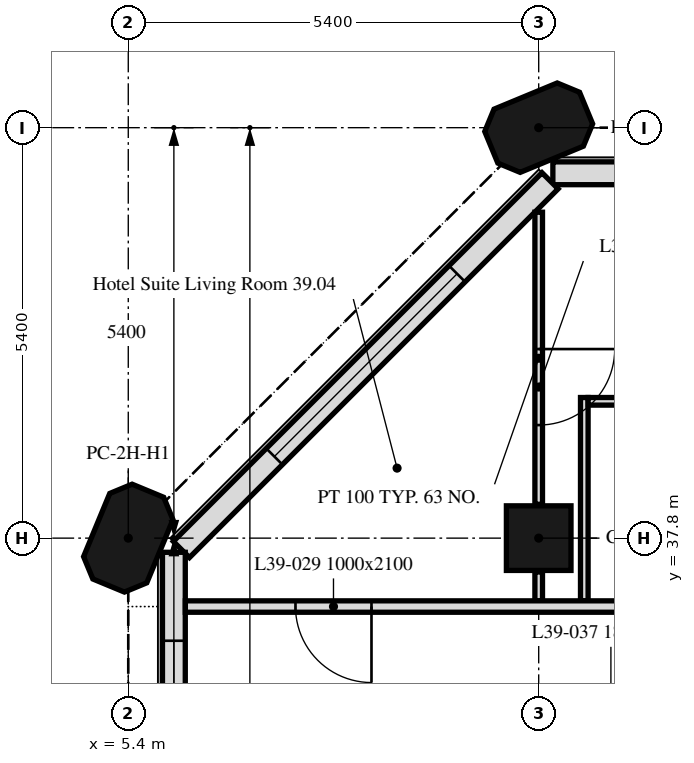
"""IFC4 building model, lengths in metres.
Left out: names, types, materials, properties, quantities, classifications, styles, units other than length and angle.
Written with IfcOpenShell. Run it as: python <this file> out.ifc"""

import sys

from ifc_helpers import new_model, si_unit, direction, frame, frame_2d, origin, origin_2d, place, context, subcontext, project, spatial, polyline, rectangle, outline, extrude, element, fill, save


model = new_model("IFC4")
c1 = context("Model", 3, precision=1e-05, world=origin(), true_north=direction((0.0, 1.0)))
c2 = subcontext(c1, "Body", "Model", "MODEL_VIEW")
j1 = project(units=[si_unit("LENGTHUNIT", "METRE"), si_unit("PLANEANGLEUNIT", "RADIAN")], contexts=[c1])
p1 = place(None, origin())
s1 = spatial("IfcSite", under=j1, at=p1, CompositionType="ELEMENT")
p2 = place(p1, origin())
s2 = spatial("IfcBuilding", under=s1, at=p2, CompositionType="ELEMENT")
p3 = place(p2, frame((0.0, 0.0, 166.0)))
s3 = spatial("IfcBuildingStorey", under=s2, at=p3, CompositionType="ELEMENT", Elevation=166.0)
p4 = place(p3, frame((5.4, 37.8, 0.0), z_axis=(0.0, 0.0, 1.0), x_axis=(0.382683432365, 0.923879532511, 0.0)))
e1 = element("IfcColumn", 1, at=p4, inside=s3, PredefinedType="COLUMN", context=c2, shape_type="SweptSolid", body=[
    extrude(outline(polyline([(-0.45, -0.45), (0.45, -0.45), (0.675, -0.225), (0.675, 0.225), (0.45, 0.45), (-0.45, 0.45), (-0.675, 0.225), (-0.675, -0.225), (-0.45, -0.45)])), origin(), (0.0, 0.0, 1.0), 3.0),
])
p5 = place(p3, frame((10.8, 37.8, 0.0), z_axis=(0.0, 0.0, 1.0), x_axis=(1.0, 0.0, 0.0)))
e2 = element("IfcColumn", 2, at=p5, inside=s3, PredefinedType="COLUMN", context=c2, shape_type="SweptSolid", body=[
    extrude(rectangle(XDim=0.85, YDim=0.85, at=origin_2d()), origin(), (0.0, 0.0, 1.0), 3.0),
])
p6 = place(p3, frame((10.8, 43.2, 0.0), z_axis=(0.0, 0.0, 1.0), x_axis=(0.923879532511, 0.382683432365, 0.0)))
e3 = element("IfcColumn", 3, at=p6, inside=s3, PredefinedType="COLUMN", context=c2, shape_type="SweptSolid", body=[
    extrude(outline(polyline([(-0.45, -0.45), (0.45, -0.45), (0.675, -0.225), (0.675, 0.225), (0.45, 0.45), (-0.45, 0.45), (-0.675, 0.225), (-0.675, -0.225), (-0.45, -0.45)])), origin(), (0.0, 0.0, 1.0), 3.0),
])
p7 = place(p3, frame((43.014, 42.6, 0.0), z_axis=(0.0, 0.0, 1.0), x_axis=(-1.0, 0.0, 0.0)))
e4 = element("IfcWall", 4, at=p7, inside=s3, PredefinedType="SOLIDWALL", context=c2, shape_type="SweptSolid", body=[
    extrude(rectangle(XDim=32.027, YDim=0.3, at=frame_2d((16.014, 0.0))), origin(), (0.0, 0.0, 1.0), 3.0),
])
p8 = place(p7, frame((0.814, 0.0, 0.9)))
e5 = element("IfcOpeningElement", 5, at=p8, cuts=e4, PredefinedType="OPENING", context=c2, shape_type="SweptSolid", body=[
    extrude(rectangle(XDim=3.4, YDim=1.7, at=frame_2d((1.7, 0.85))), frame((0.0, 0.16, 0.0), z_axis=(0.0, -1.0, 0.0), x_axis=(1.0, 0.0, 0.0)), (0.0, 0.0, 1.0), 0.32),
])
p9 = place(p7, frame((6.564, 0.0, 0.9)))
e6 = element("IfcOpeningElement", 6, at=p9, cuts=e4, PredefinedType="OPENING", context=c2, shape_type="SweptSolid", body=[
    extrude(rectangle(XDim=1.1, YDim=1.7, at=frame_2d((0.55, 0.85))), frame((0.0, 0.16, 0.0), z_axis=(0.0, -1.0, 0.0), x_axis=(1.0, 0.0, 0.0)), (0.0, 0.0, 1.0), 0.32),
])
p10 = place(p7, frame((11.614, 0.0, 0.9)))
e7 = element("IfcOpeningElement", 7, at=p10, cuts=e4, PredefinedType="OPENING", context=c2, shape_type="SweptSolid", body=[
    extrude(rectangle(XDim=3.4, YDim=1.7, at=frame_2d((1.7, 0.85))), frame((0.0, 0.16, 0.0), z_axis=(0.0, -1.0, 0.0), x_axis=(1.0, 0.0, 0.0)), (0.0, 0.0, 1.0), 0.32),
])
p11 = place(p7, frame((17.364, 0.0, 0.9)))
e8 = element("IfcOpeningElement", 8, at=p11, cuts=e4, PredefinedType="OPENING", context=c2, shape_type="SweptSolid", body=[
    extrude(rectangle(XDim=1.1, YDim=1.7, at=frame_2d((0.55, 0.85))), frame((0.0, 0.16, 0.0), z_axis=(0.0, -1.0, 0.0), x_axis=(1.0, 0.0, 0.0)), (0.0, 0.0, 1.0), 0.32),
])
p12 = place(p7, frame((22.414, 0.0, 0.9)))
e9 = element("IfcOpeningElement", 9, at=p12, cuts=e4, PredefinedType="OPENING", context=c2, shape_type="SweptSolid", body=[
    extrude(rectangle(XDim=3.4, YDim=1.7, at=frame_2d((1.7, 0.85))), frame((0.0, 0.16, 0.0), z_axis=(0.0, -1.0, 0.0), x_axis=(1.0, 0.0, 0.0)), (0.0, 0.0, 1.0), 0.32),
])
p13 = place(p7, frame((28.164, 0.0, 0.9)))
e10 = element("IfcOpeningElement", 10, at=p13, cuts=e4, PredefinedType="OPENING", context=c2, shape_type="SweptSolid", body=[
    extrude(rectangle(XDim=1.1, YDim=1.7, at=frame_2d((0.55, 0.85))), frame((0.0, 0.16, 0.0), z_axis=(0.0, -1.0, 0.0), x_axis=(1.0, 0.0, 0.0)), (0.0, 0.0, 1.0), 0.32),
])
p14 = place(p3, frame((10.949, 42.501, 0.0), z_axis=(0.0, 0.0, 1.0), x_axis=(-0.707106781187, -0.707106781187, 0.0)))
e11 = element("IfcWall", 11, at=p14, inside=s3, PredefinedType="SOLIDWALL", context=c2, shape_type="SweptSolid", body=[
    extrude(rectangle(XDim=6.86, YDim=0.3, at=frame_2d((3.43, 0.0))), origin(), (0.0, 0.0, 1.0), 3.0),
])
p15 = place(p14, frame((1.73, 0.0, 0.9)))
e12 = element("IfcOpeningElement", 12, at=p15, cuts=e11, PredefinedType="OPENING", context=c2, shape_type="SweptSolid", body=[
    extrude(rectangle(XDim=3.4, YDim=1.7, at=frame_2d((1.7, 0.85))), frame((0.0, 0.16, 0.0), z_axis=(0.0, -1.0, 0.0), x_axis=(1.0, 0.0, 0.0)), (0.0, 0.0, 1.0), 0.32),
])
p16 = place(p3, frame((6.0, 37.614, 0.0), z_axis=(0.0, 0.0, 1.0), x_axis=(0.0, -1.0, 0.0)))
e13 = element("IfcWall", 13, at=p16, inside=s3, PredefinedType="SOLIDWALL", context=c2, shape_type="SweptSolid", body=[
    extrude(rectangle(XDim=5.214, YDim=0.3, at=frame_2d((2.607, 0.0))), origin(), (0.0, 0.0, 1.0), 3.0),
])
p17 = place(p16, frame((1.164, 0.0, 0.9)))
e14 = element("IfcOpeningElement", 14, at=p17, cuts=e13, PredefinedType="OPENING", context=c2, shape_type="SweptSolid", body=[
    extrude(rectangle(XDim=1.1, YDim=1.7, at=frame_2d((0.55, 0.85))), frame((0.0, 0.16, 0.0), z_axis=(0.0, -1.0, 0.0), x_axis=(1.0, 0.0, 0.0)), (0.0, 0.0, 1.0), 0.32),
])
p18 = place(p16, frame((2.764, 0.0, 0.9)))
e15 = element("IfcOpeningElement", 15, at=p18, cuts=e13, PredefinedType="OPENING", context=c2, shape_type="SweptSolid", body=[
    extrude(rectangle(XDim=1.1, YDim=1.7, at=frame_2d((0.55, 0.85))), frame((0.0, 0.16, 0.0), z_axis=(0.0, -1.0, 0.0), x_axis=(1.0, 0.0, 0.0)), (0.0, 0.0, 1.0), 0.32),
])
p19 = place(p3, frame((10.8, 42.088, 0.0), z_axis=(0.0, 0.0, 1.0), x_axis=(0.0, -1.0, 0.0)))
e16 = element("IfcWall", 16, at=p19, inside=s3, PredefinedType="PARTITIONING", context=c2, shape_type="SweptSolid", body=[
    extrude(rectangle(XDim=3.843, YDim=0.1, at=frame_2d((1.921, 0.0))), origin(), (0.0, 0.0, 1.0), 3.0),
])
p20 = place(p19, frame((1.8, 0.0, 0.0)))
e17 = element("IfcOpeningElement", 17, at=p20, cuts=e16, PredefinedType="OPENING", context=c2, shape_type="SweptSolid", body=[
    extrude(rectangle(XDim=1.0, YDim=2.1, at=frame_2d((0.5, 1.05))), frame((0.0, 0.05, 0.0), z_axis=(0.0, -1.0, 0.0), x_axis=(1.0, 0.0, 0.0)), (0.0, 0.0, 1.0), 0.1),
])
p21 = place(p3, frame((10.8, 37.355, 0.0), z_axis=(0.0, 0.0, 1.0), x_axis=(0.0, -1.0, 0.0)))
e18 = element("IfcWall", 18, at=p21, inside=s3, PredefinedType="PARTITIONING", context=c2, shape_type="SweptSolid", body=[
    extrude(rectangle(XDim=0.38, YDim=0.1, at=frame_2d((0.19, 0.0))), origin(), (0.0, 0.0, 1.0), 3.0),
])
p22 = place(p3, frame((11.4, 36.975, 0.0), z_axis=(0.0, 0.0, 1.0), x_axis=(0.0, 1.0, 0.0)))
e19 = element("IfcWall", 19, at=p22, inside=s3, PredefinedType="PARTITIONING", context=c2, shape_type="SweptSolid", body=[
    extrude(rectangle(XDim=2.675, YDim=0.1, at=frame_2d((1.337, 0.0))), origin(), (0.0, 0.0, 1.0), 3.0),
])
p23 = place(p3, frame((11.45, 39.6, 0.0), z_axis=(0.0, 0.0, 1.0), x_axis=(1.0, 0.0, 0.0)))
e20 = element("IfcWall", 20, at=p23, inside=s3, PredefinedType="PARTITIONING", context=c2, shape_type="SweptSolid", body=[
    extrude(rectangle(XDim=2.4, YDim=0.1, at=frame_2d((1.2, 0.0))), origin(), (0.0, 0.0, 1.0), 3.0),
])
p24 = place(p3, frame((47.849, 36.9, 0.0), z_axis=(0.0, 0.0, 1.0), x_axis=(-1.0, 0.0, 0.0)))
e21 = element("IfcWall", 21, at=p24, inside=s3, PredefinedType="PARTITIONING", context=c2, shape_type="SweptSolid", body=[
    extrude(rectangle(XDim=41.698, YDim=0.15, at=frame_2d((20.849, 0.0))), origin(), (0.0, 0.0, 1.0), 3.0),
])
p25 = place(p24, frame((39.249, 0.0, 0.0)))
e22 = element("IfcOpeningElement", 22, at=p25, cuts=e21, PredefinedType="OPENING", context=c2, shape_type="SweptSolid", body=[
    extrude(rectangle(XDim=1.0, YDim=2.1, at=frame_2d((0.5, 1.05))), frame((0.0, 0.075, 0.0), z_axis=(0.0, -1.0, 0.0), x_axis=(1.0, 0.0, 0.0)), (0.0, 0.0, 1.0), 0.15),
])
p26 = place(p24, frame((28.449, 0.0, 0.0)))
e23 = element("IfcOpeningElement", 23, at=p26, cuts=e21, PredefinedType="OPENING", context=c2, shape_type="SweptSolid", body=[
    extrude(rectangle(XDim=1.0, YDim=2.1, at=frame_2d((0.5, 1.05))), frame((0.0, 0.075, 0.0), z_axis=(0.0, -1.0, 0.0), x_axis=(1.0, 0.0, 0.0)), (0.0, 0.0, 1.0), 0.15),
])
p27 = place(p24, frame((16.849, 0.0, 0.0)))
e24 = element("IfcOpeningElement", 24, at=p27, cuts=e21, PredefinedType="OPENING", context=c2, shape_type="SweptSolid", body=[
    extrude(rectangle(XDim=1.0, YDim=2.1, at=frame_2d((0.5, 1.05))), frame((0.0, 0.075, 0.0), z_axis=(0.0, -1.0, 0.0), x_axis=(1.0, 0.0, 0.0)), (0.0, 0.0, 1.0), 0.15),
])
p28 = place(p24, frame((11.449, 0.0, 0.0)))
e25 = element("IfcOpeningElement", 25, at=p28, cuts=e21, PredefinedType="OPENING", context=c2, shape_type="SweptSolid", body=[
    extrude(rectangle(XDim=1.0, YDim=2.1, at=frame_2d((0.5, 1.05))), frame((0.0, 0.075, 0.0), z_axis=(0.0, -1.0, 0.0), x_axis=(1.0, 0.0, 0.0)), (0.0, 0.0, 1.0), 0.15),
])
p29 = place(p24, frame((2.744, 0.0, 0.0)))
e26 = element("IfcOpeningElement", 26, at=p29, cuts=e21, PredefinedType="OPENING", context=c2, shape_type="SweptSolid", body=[
    extrude(rectangle(XDim=1.0, YDim=2.1, at=frame_2d((0.5, 1.05))), frame((0.0, 0.075, 0.0), z_axis=(0.0, -1.0, 0.0), x_axis=(1.0, 0.0, 0.0)), (0.0, 0.0, 1.0), 0.15),
])
p30 = place(p15, origin())
e27 = element("IfcWindow", 27, at=p30, inside=s3, PartitioningType="SINGLE_PANEL", PredefinedType="WINDOW", context=c2, shape_type="SweptSolid", body=[
    extrude(rectangle(XDim=3.4, YDim=1.7, at=frame_2d((1.7, 0.85))), frame((0.0, 0.03, 0.0), z_axis=(0.0, -1.0, 0.0), x_axis=(1.0, 0.0, 0.0)), (0.0, 0.0, 1.0), 0.06),
])
fill(e12, e27)
p31 = place(p17, origin())
e28 = element("IfcWindow", 28, at=p31, inside=s3, PartitioningType="SINGLE_PANEL", PredefinedType="WINDOW", context=c2, shape_type="SweptSolid", body=[
    extrude(rectangle(XDim=1.1, YDim=1.7, at=frame_2d((0.55, 0.85))), frame((0.0, 0.03, 0.0), z_axis=(0.0, -1.0, 0.0), x_axis=(1.0, 0.0, 0.0)), (0.0, 0.0, 1.0), 0.06),
])
fill(e14, e28)
p32 = place(p20, origin())
e29 = element("IfcDoor", 29, at=p32, inside=s3, OperationType="SINGLE_SWING_RIGHT", PredefinedType="DOOR", context=c2, shape_type="SweptSolid", body=[
    extrude(rectangle(XDim=1.0, YDim=2.1, at=frame_2d((0.5, 1.05))), frame((0.0, 0.025, 0.0), z_axis=(0.0, -1.0, 0.0), x_axis=(1.0, 0.0, 0.0)), (0.0, 0.0, 1.0), 0.05),
])
fill(e17, e29)
p33 = place(p25, origin())
e30 = element("IfcDoor", 30, at=p33, inside=s3, OperationType="SINGLE_SWING_LEFT", PredefinedType="DOOR", context=c2, shape_type="SweptSolid", body=[
    extrude(rectangle(XDim=1.0, YDim=2.1, at=frame_2d((0.5, 1.05))), frame((0.0, 0.025, 0.0), z_axis=(0.0, -1.0, 0.0), x_axis=(1.0, 0.0, 0.0)), (0.0, 0.0, 1.0), 0.05),
])
fill(e22, e30)
save(model, sys.argv[1])
